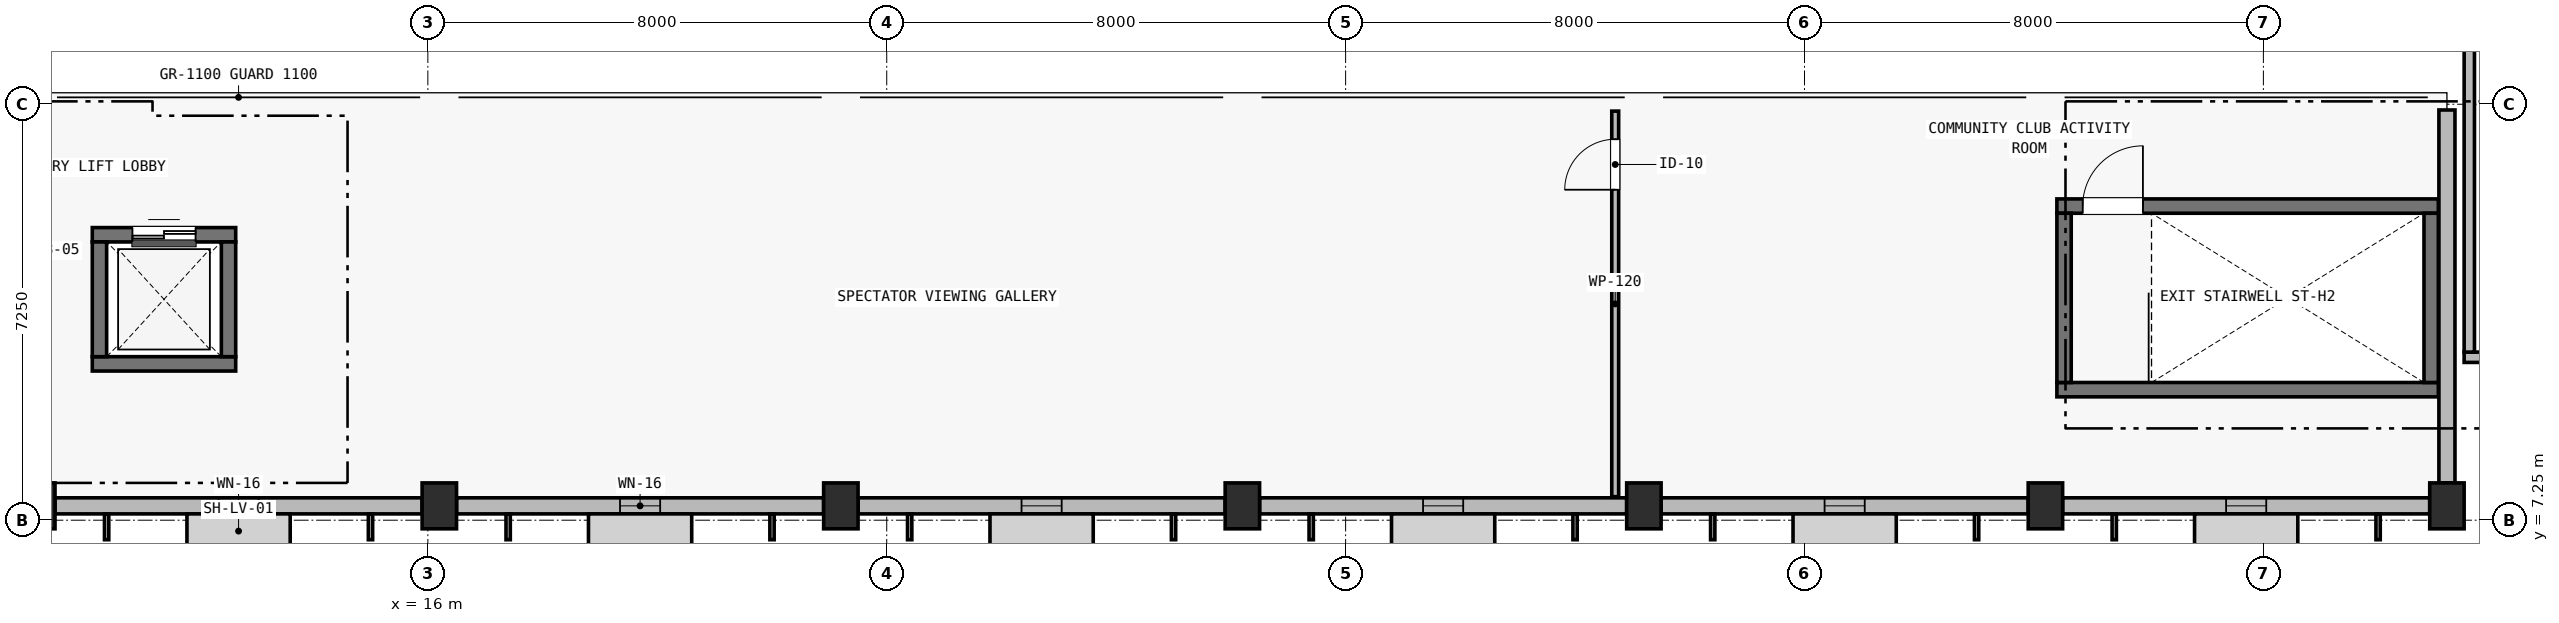
"""IFC4 building model, lengths in metres.
Left out: names, types, materials, properties, quantities, classifications, styles, units other than length and angle.
Written with IfcOpenShell. Run it as: python <this file> out.ifc"""

import sys

from ifc_helpers import new_model, si_unit, direction, frame, frame_2d, origin, origin_2d, place, context, subcontext, project, spatial, rectangle, extrude, element, fill, save


model = new_model("IFC4")
c1 = context("Model", 3, precision=1e-05, world=origin(), true_north=direction((0.0, 1.0)))
c2 = subcontext(c1, "Body", "Model", "MODEL_VIEW")
j1 = project(units=[si_unit("LENGTHUNIT", "METRE"), si_unit("PLANEANGLEUNIT", "RADIAN")], contexts=[c1])
p1 = place(None, origin())
s1 = spatial("IfcSite", under=j1, at=p1, CompositionType="ELEMENT")
p2 = place(p1, origin())
s2 = spatial("IfcBuilding", under=s1, at=p2, CompositionType="ELEMENT")
p3 = place(p2, frame((0.0, 0.0, 4.5)))
s3 = spatial("IfcBuildingStorey", under=s2, at=p3, CompositionType="ELEMENT", Elevation=4.5)
for number, where, z_axis, x_axis in (
    (1, (9.2, 7.5, 0.0), (0.0, 0.0, 1.0), (1.0, 0.0, 0.0)),
    (2, (16.2, 7.5, 0.0), (0.0, 0.0, 1.0), (1.0, 0.0, 0.0)),
    (3, (23.2, 7.5, 0.0), (0.0, 0.0, 1.0), (1.0, 0.0, 0.0)),
    (4, (30.2, 7.5, 0.0), (0.0, 0.0, 1.0), (1.0, 0.0, 0.0)),
    (5, (37.2, 7.5, 0.0), (0.0, 0.0, 1.0), (1.0, 0.0, 0.0)),
    (6, (44.2, 7.5, 0.0), (0.0, 0.0, 1.0), (1.0, 0.0, 0.0)),
    (7, (51.2, 7.5, 0.0), (0.0, 0.0, 1.0), (1.0, 0.0, 0.0)),
):
    element("IfcColumn", number, at=place(p3, frame(where, z_axis=z_axis, x_axis=x_axis)), inside=s3, PredefinedType="COLUMN", context=c2, shape_type="SweptSolid", body=[
        extrude(rectangle(XDim=0.6, YDim=0.8, at=origin_2d()), origin(), (0.0, 0.0, 1.0), 3.266),
    ])
p4 = place(p3, frame((44.4, 12.725, 0.0), z_axis=(0.0, 0.0, 1.0), x_axis=(1.0, 0.0, 0.0)))
e8 = element("IfcWall", 8, at=p4, inside=s3, PredefinedType="SHEAR", context=c2, shape_type="SweptSolid", body=[
    extrude(rectangle(XDim=6.65, YDim=0.25, at=frame_2d((3.325, 0.0))), origin(), (0.0, 0.0, 1.0), 3.9),
])
p5 = place(p4, frame((0.45, 0.0, 0.0)))
e9 = element("IfcOpeningElement", 9, at=p5, cuts=e8, PredefinedType="OPENING", context=c2, shape_type="SweptSolid", body=[
    extrude(rectangle(XDim=1.05, YDim=2.15, at=frame_2d((0.525, 1.075))), frame((0.0, 0.14, 0.0), z_axis=(0.0, -1.0, 0.0), x_axis=(1.0, 0.0, 0.0)), (0.0, 0.0, 1.0), 0.28),
])
p6 = place(p3, frame((44.4, 9.525, 0.0), z_axis=(0.0, 0.0, 1.0), x_axis=(1.0, 0.0, 0.0)))
e10 = element("IfcWall", 10, at=p6, inside=s3, PredefinedType="SHEAR", context=c2, shape_type="SweptSolid", body=[
    extrude(rectangle(XDim=6.65, YDim=0.25, at=frame_2d((3.325, 0.0))), origin(), (0.0, 0.0, 1.0), 3.9),
])
for number, where, z_axis, x_axis in (
    (11, (44.525, 9.65, 0.0), (0.0, 0.0, 1.0), (0.0, 1.0, 0.0)),
    (12, (50.925, 9.65, 0.0), (0.0, 0.0, 1.0), (0.0, 1.0, 0.0)),
):
    element("IfcWall", number, at=place(p3, frame(where, z_axis=z_axis, x_axis=x_axis)), inside=s3, PredefinedType="SHEAR", context=c2, shape_type="SweptSolid", body=[
        extrude(rectangle(XDim=2.95, YDim=0.25, at=frame_2d((1.475, 0.0))), origin(), (0.0, 0.0, 1.0), 3.9),
    ])
p7 = place(p3, frame((10.15, 12.225, 0.0), z_axis=(0.0, 0.0, 1.0), x_axis=(1.0, 0.0, 0.0)))
e13 = element("IfcWall", 13, at=p7, inside=s3, PredefinedType="SHEAR", context=c2, shape_type="SweptSolid", body=[
    extrude(rectangle(XDim=2.5, YDim=0.25, at=frame_2d((1.25, 0.0))), origin(), (0.0, 0.0, 1.0), 3.9),
])
p8 = place(p7, frame((0.7, 0.0, 0.0)))
e14 = element("IfcOpeningElement", 14, at=p8, cuts=e13, PredefinedType="OPENING", context=c2, shape_type="SweptSolid", body=[
    extrude(rectangle(XDim=1.1, YDim=2.15, at=frame_2d((0.55, 1.075))), frame((0.0, 0.14, 0.0), z_axis=(0.0, -1.0, 0.0), x_axis=(1.0, 0.0, 0.0)), (0.0, 0.0, 1.0), 0.28),
])
p9 = place(p3, frame((10.15, 9.975, 0.0), z_axis=(0.0, 0.0, 1.0), x_axis=(1.0, 0.0, 0.0)))
e15 = element("IfcWall", 15, at=p9, inside=s3, PredefinedType="SHEAR", context=c2, shape_type="SweptSolid", body=[
    extrude(rectangle(XDim=2.5, YDim=0.25, at=frame_2d((1.25, 0.0))), origin(), (0.0, 0.0, 1.0), 3.9),
])
for number, where, z_axis, x_axis in (
    (16, (10.275, 10.1, 0.0), (0.0, 0.0, 1.0), (0.0, 1.0, 0.0)),
    (17, (12.525, 10.1, 0.0), (0.0, 0.0, 1.0), (0.0, 1.0, 0.0)),
):
    element("IfcWall", number, at=place(p3, frame(where, z_axis=z_axis, x_axis=x_axis)), inside=s3, PredefinedType="SHEAR", context=c2, shape_type="SweptSolid", body=[
        extrude(rectangle(XDim=2.0, YDim=0.25, at=frame_2d((1.0, 0.0))), origin(), (0.0, 0.0, 1.0), 3.9),
    ])
p10 = place(p3, frame((15.9, 7.5, 0.0), z_axis=(0.0, 0.0, 1.0), x_axis=(-1.0, 0.0, 0.0)))
e18 = element("IfcWall", 18, at=p10, inside=s3, PredefinedType="SOLIDWALL", context=c2, shape_type="SweptSolid", body=[
    extrude(rectangle(XDim=6.4, YDim=0.28, at=frame_2d((3.2, 0.0))), origin(), (0.0, 0.0, 1.0), 2.48),
])
p11 = place(p10, frame((2.85, 0.0, 0.28)))
e19 = element("IfcOpeningElement", 19, at=p11, cuts=e18, PredefinedType="OPENING", context=c2, shape_type="SweptSolid", body=[
    extrude(rectangle(XDim=0.7, YDim=2.14, at=frame_2d((0.35, 1.07))), frame((0.0, 0.155, 0.0), z_axis=(0.0, -1.0, 0.0), x_axis=(1.0, 0.0, 0.0)), (0.0, 0.0, 1.0), 0.31),
])
p12 = place(p3, frame((22.9, 7.5, 0.0), z_axis=(0.0, 0.0, 1.0), x_axis=(-1.0, 0.0, 0.0)))
e20 = element("IfcWall", 20, at=p12, inside=s3, PredefinedType="SOLIDWALL", context=c2, shape_type="SweptSolid", body=[
    extrude(rectangle(XDim=6.4, YDim=0.28, at=frame_2d((3.2, 0.0))), origin(), (0.0, 0.0, 1.0), 2.48),
])
p13 = place(p12, frame((2.85, 0.0, 0.28)))
e21 = element("IfcOpeningElement", 21, at=p13, cuts=e20, PredefinedType="OPENING", context=c2, shape_type="SweptSolid", body=[
    extrude(rectangle(XDim=0.7, YDim=2.14, at=frame_2d((0.35, 1.07))), frame((0.0, 0.155, 0.0), z_axis=(0.0, -1.0, 0.0), x_axis=(1.0, 0.0, 0.0)), (0.0, 0.0, 1.0), 0.31),
])
p14 = place(p3, frame((29.9, 7.5, 0.0), z_axis=(0.0, 0.0, 1.0), x_axis=(-1.0, 0.0, 0.0)))
e22 = element("IfcWall", 22, at=p14, inside=s3, PredefinedType="SOLIDWALL", context=c2, shape_type="SweptSolid", body=[
    extrude(rectangle(XDim=6.4, YDim=0.28, at=frame_2d((3.2, 0.0))), origin(), (0.0, 0.0, 1.0), 2.48),
])
p15 = place(p14, frame((2.85, 0.0, 0.28)))
e23 = element("IfcOpeningElement", 23, at=p15, cuts=e22, PredefinedType="OPENING", context=c2, shape_type="SweptSolid", body=[
    extrude(rectangle(XDim=0.7, YDim=2.14, at=frame_2d((0.35, 1.07))), frame((0.0, 0.155, 0.0), z_axis=(0.0, -1.0, 0.0), x_axis=(1.0, 0.0, 0.0)), (0.0, 0.0, 1.0), 0.31),
])
p16 = place(p3, frame((36.9, 7.5, 0.0), z_axis=(0.0, 0.0, 1.0), x_axis=(-1.0, 0.0, 0.0)))
e24 = element("IfcWall", 24, at=p16, inside=s3, PredefinedType="SOLIDWALL", context=c2, shape_type="SweptSolid", body=[
    extrude(rectangle(XDim=6.4, YDim=0.28, at=frame_2d((3.2, 0.0))), origin(), (0.0, 0.0, 1.0), 2.48),
])
p17 = place(p16, frame((2.85, 0.0, 0.28)))
e25 = element("IfcOpeningElement", 25, at=p17, cuts=e24, PredefinedType="OPENING", context=c2, shape_type="SweptSolid", body=[
    extrude(rectangle(XDim=0.7, YDim=2.14, at=frame_2d((0.35, 1.07))), frame((0.0, 0.155, 0.0), z_axis=(0.0, -1.0, 0.0), x_axis=(1.0, 0.0, 0.0)), (0.0, 0.0, 1.0), 0.31),
])
p18 = place(p3, frame((43.9, 7.5, 0.0), z_axis=(0.0, 0.0, 1.0), x_axis=(-1.0, 0.0, 0.0)))
e26 = element("IfcWall", 26, at=p18, inside=s3, PredefinedType="SOLIDWALL", context=c2, shape_type="SweptSolid", body=[
    extrude(rectangle(XDim=6.4, YDim=0.28, at=frame_2d((3.2, 0.0))), origin(), (0.0, 0.0, 1.0), 2.48),
])
p19 = place(p18, frame((2.85, 0.0, 0.28)))
e27 = element("IfcOpeningElement", 27, at=p19, cuts=e26, PredefinedType="OPENING", context=c2, shape_type="SweptSolid", body=[
    extrude(rectangle(XDim=0.7, YDim=2.14, at=frame_2d((0.35, 1.07))), frame((0.0, 0.155, 0.0), z_axis=(0.0, -1.0, 0.0), x_axis=(1.0, 0.0, 0.0)), (0.0, 0.0, 1.0), 0.31),
])
p20 = place(p3, frame((50.9, 7.5, 0.0), z_axis=(0.0, 0.0, 1.0), x_axis=(-1.0, 0.0, 0.0)))
e28 = element("IfcWall", 28, at=p20, inside=s3, PredefinedType="SOLIDWALL", context=c2, shape_type="SweptSolid", body=[
    extrude(rectangle(XDim=6.4, YDim=0.28, at=frame_2d((3.2, 0.0))), origin(), (0.0, 0.0, 1.0), 2.48),
])
p21 = place(p20, frame((2.85, 0.0, 0.28)))
e29 = element("IfcOpeningElement", 29, at=p21, cuts=e28, PredefinedType="OPENING", context=c2, shape_type="SweptSolid", body=[
    extrude(rectangle(XDim=0.7, YDim=2.14, at=frame_2d((0.35, 1.07))), frame((0.0, 0.155, 0.0), z_axis=(0.0, -1.0, 0.0), x_axis=(1.0, 0.0, 0.0)), (0.0, 0.0, 1.0), 0.31),
])
p22 = place(p3, frame((51.2, 14.4, 0.0), z_axis=(0.0, 0.0, 1.0), x_axis=(0.0, -1.0, 0.0)))
e30 = element("IfcWall", 30, at=p22, inside=s3, PredefinedType="SOLIDWALL", context=c2, shape_type="SweptSolid", body=[
    extrude(rectangle(XDim=6.5, YDim=0.28, at=frame_2d((3.25, 0.0))), origin(), (0.0, 0.0, 1.0), 2.86),
])
p23 = place(p2, origin())
s4 = spatial("IfcBuildingStorey", under=s2, at=p23, CompositionType="ELEMENT", Elevation=0.0)
p24 = place(p23, frame((51.2, 43.1, 0.0), z_axis=(0.0, 0.0, 1.0), x_axis=(0.0, -1.0, 0.0)))
e31 = element("IfcWall", 31, at=p24, inside=s4, PredefinedType="SOLIDWALL", context=c2, shape_type="SweptSolid", body=[
    extrude(rectangle(XDim=28.1, YDim=0.28, at=frame_2d((14.05, 0.0))), origin(), (0.0, 0.0, 1.0), 7.38),
])
p25 = place(p24, frame((2.2, 0.0, 3.2)))
e32 = element("IfcOpeningElement", 32, at=p25, cuts=e31, PredefinedType="OPENING", context=c2, shape_type="SweptSolid", body=[
    extrude(rectangle(XDim=0.64, YDim=2.18, at=frame_2d((0.32, 1.09))), frame((0.0, 0.155, 0.0), z_axis=(0.0, -1.0, 0.0), x_axis=(1.0, 0.0, 0.0)), (0.0, 0.0, 1.0), 0.31),
])
p26 = place(p24, frame((5.2, 0.0, 3.2)))
e33 = element("IfcOpeningElement", 33, at=p26, cuts=e31, PredefinedType="OPENING", context=c2, shape_type="SweptSolid", body=[
    extrude(rectangle(XDim=0.7, YDim=2.36, at=frame_2d((0.35, 1.18))), frame((0.0, 0.155, 0.0), z_axis=(0.0, -1.0, 0.0), x_axis=(1.0, 0.0, 0.0)), (0.0, 0.0, 1.0), 0.31),
])
p27 = place(p24, frame((14.5, 0.0, 3.2)))
e34 = element("IfcOpeningElement", 34, at=p27, cuts=e31, PredefinedType="OPENING", context=c2, shape_type="SweptSolid", body=[
    extrude(rectangle(XDim=0.76, YDim=2.34, at=frame_2d((0.38, 1.17))), frame((0.0, 0.155, 0.0), z_axis=(0.0, -1.0, 0.0), x_axis=(1.0, 0.0, 0.0)), (0.0, 0.0, 1.0), 0.31),
])
p28 = place(p24, frame((19.0, 0.0, 3.2)))
e35 = element("IfcOpeningElement", 35, at=p28, cuts=e31, PredefinedType="OPENING", context=c2, shape_type="SweptSolid", body=[
    extrude(rectangle(XDim=0.82, YDim=2.18, at=frame_2d((0.41, 1.09))), frame((0.0, 0.155, 0.0), z_axis=(0.0, -1.0, 0.0), x_axis=(1.0, 0.0, 0.0)), (0.0, 0.0, 1.0), 0.31),
])
p29 = place(p24, frame((23.5, 0.0, 3.2)))
e36 = element("IfcOpeningElement", 36, at=p29, cuts=e31, PredefinedType="OPENING", context=c2, shape_type="SweptSolid", body=[
    extrude(rectangle(XDim=0.58, YDim=2.16, at=frame_2d((0.29, 1.08))), frame((0.0, 0.155, 0.0), z_axis=(0.0, -1.0, 0.0), x_axis=(1.0, 0.0, 0.0)), (0.0, 0.0, 1.0), 0.31),
])
p30 = place(p3, frame((55.1, 10.09, 0.05), z_axis=(0.0, 0.0, 1.0), x_axis=(-1.0, 0.0, 0.0)))
e37 = element("IfcWall", 37, at=p30, inside=s3, PredefinedType="PARAPET", context=c2, shape_type="SweptSolid", body=[
    extrude(rectangle(XDim=3.6, YDim=0.18, at=frame_2d((1.8, 0.0))), origin(), (0.0, 0.0, 1.0), 0.45),
])
p31 = place(p3, frame((51.59, 10.18, 0.05), z_axis=(0.0, 0.0, 1.0), x_axis=(0.0, 1.0, 0.0)))
e38 = element("IfcWall", 38, at=p31, inside=s3, PredefinedType="PARAPET", context=c2, shape_type="SweptSolid", body=[
    extrude(rectangle(XDim=11.64, YDim=0.18, at=frame_2d((5.82, 0.0))), origin(), (0.0, 0.0, 1.0), 0.45),
])
p32 = place(p3, frame((36.7, 7.66, 0.0), z_axis=(0.0, 0.0, 1.0), x_axis=(0.0, 1.0, 0.0)))
e39 = element("IfcWall", 39, at=p32, inside=s3, PredefinedType="PARTITIONING", context=c2, shape_type="SweptSolid", body=[
    extrude(rectangle(XDim=6.72, YDim=0.12, at=frame_2d((3.36, 0.0))), origin(), (0.0, 0.0, 1.0), 3.0),
])
p33 = place(p32, frame((5.35, 0.0, 0.0)))
e40 = element("IfcOpeningElement", 40, at=p33, cuts=e39, PredefinedType="OPENING", context=c2, shape_type="SweptSolid", body=[
    extrude(rectangle(XDim=0.88, YDim=2.1, at=frame_2d((0.44, 1.05))), frame((0.0, 0.075, 0.0), z_axis=(0.0, -1.0, 0.0), x_axis=(1.0, 0.0, 0.0)), (0.0, 0.0, 1.0), 0.15),
])
p34 = place(p11, origin())
e41 = element("IfcWindow", 41, at=p34, inside=s3, PartitioningType="SINGLE_PANEL", PredefinedType="WINDOW", context=c2, shape_type="SweptSolid", body=[
    extrude(rectangle(XDim=0.7, YDim=2.14, at=frame_2d((0.35, 1.07))), frame((0.0, 0.03, 0.0), z_axis=(0.0, -1.0, 0.0), x_axis=(1.0, 0.0, 0.0)), (0.0, 0.0, 1.0), 0.06),
])
fill(e19, e41)
p35 = place(p13, origin())
e42 = element("IfcWindow", 42, at=p35, inside=s3, PartitioningType="SINGLE_PANEL", PredefinedType="WINDOW", context=c2, shape_type="SweptSolid", body=[
    extrude(rectangle(XDim=0.7, YDim=2.14, at=frame_2d((0.35, 1.07))), frame((0.0, 0.03, 0.0), z_axis=(0.0, -1.0, 0.0), x_axis=(1.0, 0.0, 0.0)), (0.0, 0.0, 1.0), 0.06),
])
fill(e21, e42)
p36 = place(p15, origin())
e43 = element("IfcWindow", 43, at=p36, inside=s3, PartitioningType="SINGLE_PANEL", PredefinedType="WINDOW", context=c2, shape_type="SweptSolid", body=[
    extrude(rectangle(XDim=0.7, YDim=2.14, at=frame_2d((0.35, 1.07))), frame((0.0, 0.03, 0.0), z_axis=(0.0, -1.0, 0.0), x_axis=(1.0, 0.0, 0.0)), (0.0, 0.0, 1.0), 0.06),
])
fill(e23, e43)
p37 = place(p17, origin())
e44 = element("IfcWindow", 44, at=p37, inside=s3, PartitioningType="SINGLE_PANEL", PredefinedType="WINDOW", context=c2, shape_type="SweptSolid", body=[
    extrude(rectangle(XDim=0.7, YDim=2.14, at=frame_2d((0.35, 1.07))), frame((0.0, 0.03, 0.0), z_axis=(0.0, -1.0, 0.0), x_axis=(1.0, 0.0, 0.0)), (0.0, 0.0, 1.0), 0.06),
])
fill(e25, e44)
p38 = place(p19, origin())
e45 = element("IfcWindow", 45, at=p38, inside=s3, PartitioningType="SINGLE_PANEL", PredefinedType="WINDOW", context=c2, shape_type="SweptSolid", body=[
    extrude(rectangle(XDim=0.7, YDim=2.14, at=frame_2d((0.35, 1.07))), frame((0.0, 0.03, 0.0), z_axis=(0.0, -1.0, 0.0), x_axis=(1.0, 0.0, 0.0)), (0.0, 0.0, 1.0), 0.06),
])
fill(e27, e45)
p39 = place(p21, origin())
e46 = element("IfcWindow", 46, at=p39, inside=s3, PartitioningType="SINGLE_PANEL", PredefinedType="WINDOW", context=c2, shape_type="SweptSolid", body=[
    extrude(rectangle(XDim=0.7, YDim=2.14, at=frame_2d((0.35, 1.07))), frame((0.0, 0.03, 0.0), z_axis=(0.0, -1.0, 0.0), x_axis=(1.0, 0.0, 0.0)), (0.0, 0.0, 1.0), 0.06),
])
fill(e29, e46)
p40 = place(p33, origin())
e47 = element("IfcDoor", 47, at=p40, inside=s3, OperationType="SINGLE_SWING_LEFT", PredefinedType="DOOR", context=c2, shape_type="SweptSolid", body=[
    extrude(rectangle(XDim=0.88, YDim=2.1, at=frame_2d((0.44, 1.05))), frame((0.0, 0.025, 0.0), z_axis=(0.0, -1.0, 0.0), x_axis=(1.0, 0.0, 0.0)), (0.0, 0.0, 1.0), 0.05),
])
fill(e40, e47)
p41 = place(p5, origin())
e48 = element("IfcDoor", 48, at=p41, inside=s3, OperationType="SINGLE_SWING_RIGHT", PredefinedType="DOOR", context=c2, shape_type="SweptSolid", body=[
    extrude(rectangle(XDim=1.05, YDim=2.15, at=frame_2d((0.525, 1.075))), frame((0.0, 0.025, 0.0), z_axis=(0.0, -1.0, 0.0), x_axis=(1.0, 0.0, 0.0)), (0.0, 0.0, 1.0), 0.05),
])
fill(e9, e48)
p42 = place(p8, origin())
e49 = element("IfcDoor", 49, at=p42, inside=s3, OperationType="DOUBLE_DOOR_SLIDING", PredefinedType="DOOR", context=c2, shape_type="SweptSolid", body=[
    extrude(rectangle(XDim=1.1, YDim=2.15, at=frame_2d((0.55, 1.075))), frame((0.0, 0.025, 0.0), z_axis=(0.0, -1.0, 0.0), x_axis=(1.0, 0.0, 0.0)), (0.0, 0.0, 1.0), 0.05),
])
fill(e14, e49)
save(model, sys.argv[1])
